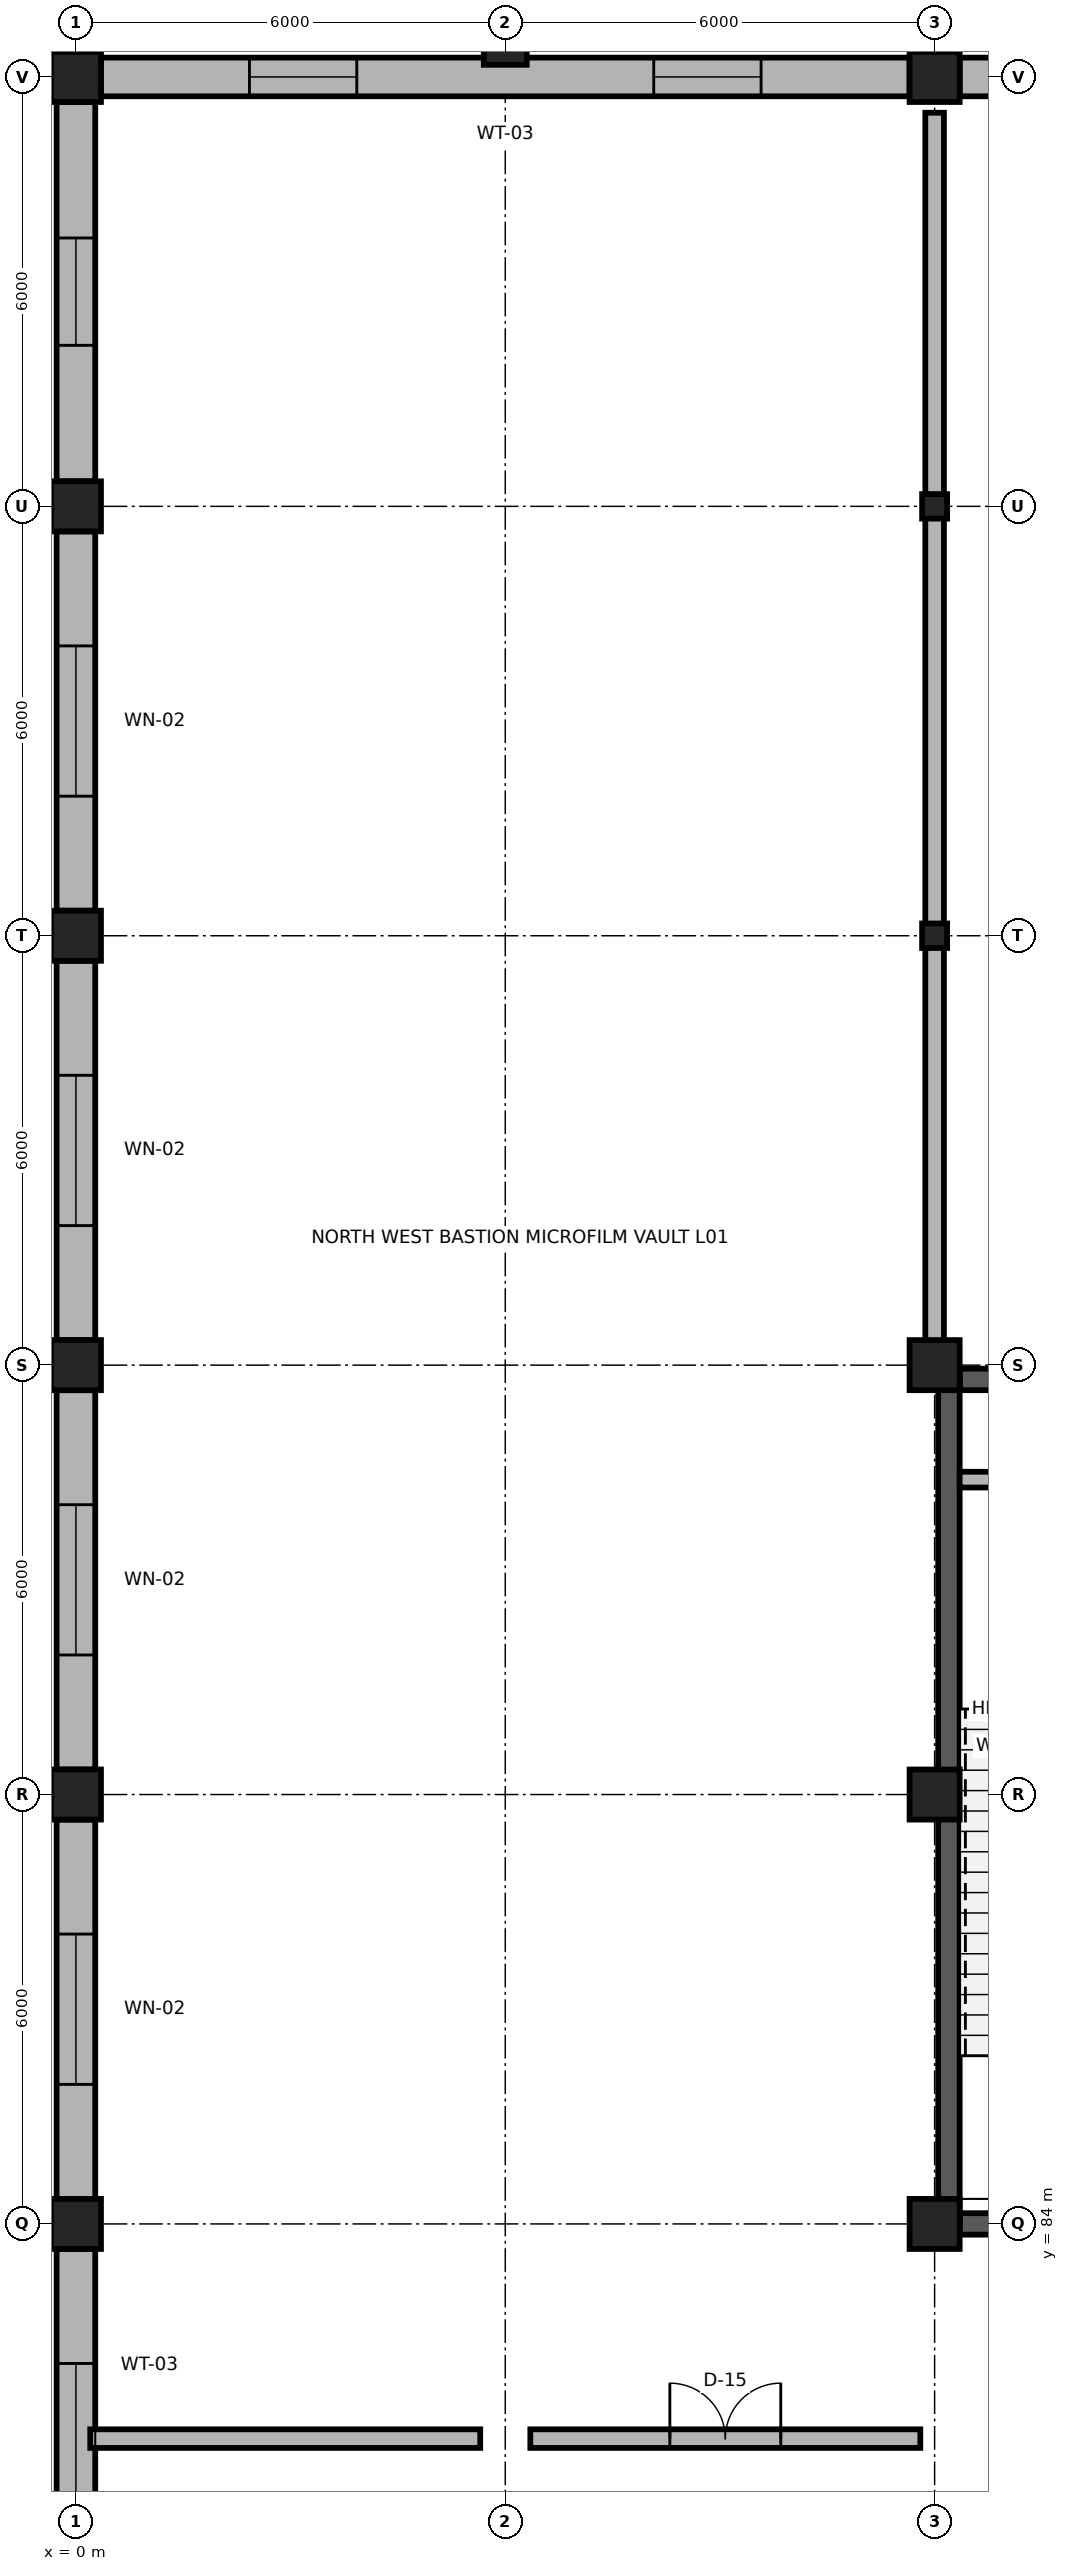
"""IFC4 building model, lengths in metres.
Left out: names, types, materials, properties, quantities, classifications, styles, units other than length and angle.
Written with IfcOpenShell. Run it as: python <this file> out.ifc"""

import sys

from ifc_helpers import new_model, si_unit, direction, frame, frame_2d, origin, origin_2d, place, context, subcontext, project, spatial, rectangle, i_section, extrude, element, fill, save


model = new_model("IFC4")
c1 = context("Model", 3, precision=1e-05, world=origin(), true_north=direction((0.0, 1.0)))
c2 = subcontext(c1, "Body", "Model", "MODEL_VIEW")
j1 = project(units=[si_unit("LENGTHUNIT", "METRE"), si_unit("PLANEANGLEUNIT", "RADIAN")], contexts=[c1])
p1 = place(None, origin())
s1 = spatial("IfcSite", under=j1, at=p1, CompositionType="ELEMENT")
p2 = place(p1, origin())
s2 = spatial("IfcBuilding", under=s1, at=p2, CompositionType="ELEMENT")
p3 = place(p2, origin())
s3 = spatial("IfcBuildingStorey", under=s2, at=p3, CompositionType="ELEMENT", Elevation=0.0)
for number, where, z_axis, x_axis in (
    (1, (0.0, 84.0, 0.0), (0.0, 0.0, 1.0), (1.0, 0.0, 0.0)),
    (2, (12.0, 84.0, 0.0), (0.0, 0.0, 1.0), (1.0, 0.0, 0.0)),
    (3, (0.0, 90.0, 0.0), (0.0, 0.0, 1.0), (1.0, 0.0, 0.0)),
    (4, (12.0, 90.0, 0.0), (0.0, 0.0, 1.0), (1.0, 0.0, 0.0)),
    (5, (0.0, 96.0, 0.0), (0.0, 0.0, 1.0), (1.0, 0.0, 0.0)),
    (6, (12.0, 96.0, 0.0), (0.0, 0.0, 1.0), (1.0, 0.0, 0.0)),
    (7, (0.0, 102.0, 0.0), (0.0, 0.0, 1.0), (1.0, 0.0, 0.0)),
):
    element("IfcColumn", number, at=place(p3, frame(where, z_axis=z_axis, x_axis=x_axis)), inside=s3, PredefinedType="COLUMN", context=c2, shape_type="SweptSolid", body=[
        extrude(rectangle(XDim=0.7, YDim=0.7, at=origin_2d()), origin(), (0.0, 0.0, 1.0), 6.0),
    ])
p4 = place(p3, frame((12.0, 102.0, 0.0), z_axis=(0.0, 0.0, 1.0), x_axis=(1.0, 0.0, 0.0)))
e8 = element("IfcColumn", 8, at=p4, inside=s3, PredefinedType="COLUMN", context=c2, shape_type="SweptSolid", body=[
    extrude(i_section(OverallWidth=0.35, OverallDepth=0.343, WebThickness=0.01, FlangeThickness=0.015, FilletRadius=0.02, at=origin_2d()), origin(), (0.0, 0.0, 1.0), 6.0),
])
p5 = place(p3, frame((0.0, 108.0, 0.0), z_axis=(0.0, 0.0, 1.0), x_axis=(1.0, 0.0, 0.0)))
e9 = element("IfcColumn", 9, at=p5, inside=s3, PredefinedType="COLUMN", context=c2, shape_type="SweptSolid", body=[
    extrude(rectangle(XDim=0.7, YDim=0.7, at=origin_2d()), origin(), (0.0, 0.0, 1.0), 6.0),
])
p6 = place(p3, frame((12.0, 108.0, 0.0), z_axis=(0.0, 0.0, 1.0), x_axis=(1.0, 0.0, 0.0)))
e10 = element("IfcColumn", 10, at=p6, inside=s3, PredefinedType="COLUMN", context=c2, shape_type="SweptSolid", body=[
    extrude(i_section(OverallWidth=0.35, OverallDepth=0.343, WebThickness=0.01, FlangeThickness=0.015, FilletRadius=0.02, at=origin_2d()), origin(), (0.0, 0.0, 1.0), 6.0),
])
for number, where, z_axis, x_axis in (
    (11, (0.0, 114.0, 0.0), (0.0, 0.0, 1.0), (1.0, 0.0, 0.0)),
    (12, (12.0, 114.0, 0.0), (0.0, 0.0, 1.0), (1.0, 0.0, 0.0)),
):
    element("IfcColumn", number, at=place(p3, frame(where, z_axis=z_axis, x_axis=x_axis)), inside=s3, PredefinedType="COLUMN", context=c2, shape_type="SweptSolid", body=[
        extrude(rectangle(XDim=0.7, YDim=0.7, at=origin_2d()), origin(), (0.0, 0.0, 1.0), 6.0),
    ])
p7 = place(p3, frame((6.0, 114.35, 0.0), z_axis=(0.0, 0.0, 1.0), x_axis=(1.0, 0.0, 0.0)))
e13 = element("IfcColumn", 13, at=p7, inside=s3, PredefinedType="PILASTER", context=c2, shape_type="SweptSolid", body=[
    extrude(rectangle(XDim=0.6, YDim=0.36, at=origin_2d()), origin(), (0.0, 0.0, 1.0), 6.0),
])
p8 = place(p3, frame((0.35, 114.0, 0.0), z_axis=(0.0, 0.0, 1.0), x_axis=(1.0, 0.0, 0.0)))
e14 = element("IfcWall", 14, at=p8, inside=s3, PredefinedType="SOLIDWALL", context=c2, shape_type="SweptSolid", body=[
    extrude(rectangle(XDim=11.3, YDim=0.54, at=frame_2d((5.65, 0.0))), origin(), (0.0, 0.0, 1.0), 5.31),
])
p9 = place(p8, frame((2.075, 0.0, 0.85)))
e15 = element("IfcOpeningElement", 15, at=p9, cuts=e14, PredefinedType="OPENING", context=c2, shape_type="SweptSolid", body=[
    extrude(rectangle(XDim=1.5, YDim=2.8, at=frame_2d((0.75, 1.4))), frame((0.0, 0.285, 0.0), z_axis=(0.0, -1.0, 0.0), x_axis=(1.0, 0.0, 0.0)), (0.0, 0.0, 1.0), 0.57),
])
p10 = place(p8, frame((7.725, 0.0, 0.85)))
e16 = element("IfcOpeningElement", 16, at=p10, cuts=e14, PredefinedType="OPENING", context=c2, shape_type="SweptSolid", body=[
    extrude(rectangle(XDim=1.5, YDim=2.8, at=frame_2d((0.75, 1.4))), frame((0.0, 0.285, 0.0), z_axis=(0.0, -1.0, 0.0), x_axis=(1.0, 0.0, 0.0)), (0.0, 0.0, 1.0), 0.57),
])
p11 = place(p3, frame((12.35, 114.0, 0.0), z_axis=(0.0, 0.0, 1.0), x_axis=(1.0, 0.0, 0.0)))
e17 = element("IfcWall", 17, at=p11, inside=s3, PredefinedType="SOLIDWALL", context=c2, shape_type="SweptSolid", body=[
    extrude(rectangle(XDim=5.3, YDim=0.54, at=frame_2d((2.65, 0.0))), origin(), (0.0, 0.0, 1.0), 5.31),
])
p12 = place(p3, frame((0.0, 78.35, 0.0), z_axis=(0.0, 0.0, 1.0), x_axis=(0.0, 1.0, 0.0)))
e18 = element("IfcWall", 18, at=p12, inside=s3, PredefinedType="SOLIDWALL", context=c2, shape_type="SweptSolid", body=[
    extrude(rectangle(XDim=5.3, YDim=0.54, at=frame_2d((2.65, 0.0))), origin(), (0.0, 0.0, 1.0), 5.31),
])
p13 = place(p12, frame((1.6, 0.0, 0.85)))
e19 = element("IfcOpeningElement", 19, at=p13, cuts=e18, PredefinedType="OPENING", context=c2, shape_type="SweptSolid", body=[
    extrude(rectangle(XDim=2.1, YDim=3.4, at=frame_2d((1.05, 1.7))), frame((0.0, 0.285, 0.0), z_axis=(0.0, -1.0, 0.0), x_axis=(1.0, 0.0, 0.0)), (0.0, 0.0, 1.0), 0.57),
])
p14 = place(p3, frame((0.0, 84.35, 0.0), z_axis=(0.0, 0.0, 1.0), x_axis=(0.0, 1.0, 0.0)))
e20 = element("IfcWall", 20, at=p14, inside=s3, PredefinedType="SOLIDWALL", context=c2, shape_type="SweptSolid", body=[
    extrude(rectangle(XDim=5.3, YDim=0.54, at=frame_2d((2.65, 0.0))), origin(), (0.0, 0.0, 1.0), 5.31),
])
p15 = place(p14, frame((1.6, 0.0, 0.85)))
e21 = element("IfcOpeningElement", 21, at=p15, cuts=e20, PredefinedType="OPENING", context=c2, shape_type="SweptSolid", body=[
    extrude(rectangle(XDim=2.1, YDim=3.4, at=frame_2d((1.05, 1.7))), frame((0.0, 0.285, 0.0), z_axis=(0.0, -1.0, 0.0), x_axis=(1.0, 0.0, 0.0)), (0.0, 0.0, 1.0), 0.57),
])
p16 = place(p3, frame((0.0, 90.35, 0.0), z_axis=(0.0, 0.0, 1.0), x_axis=(0.0, 1.0, 0.0)))
e22 = element("IfcWall", 22, at=p16, inside=s3, PredefinedType="SOLIDWALL", context=c2, shape_type="SweptSolid", body=[
    extrude(rectangle(XDim=5.3, YDim=0.54, at=frame_2d((2.65, 0.0))), origin(), (0.0, 0.0, 1.0), 5.31),
])
p17 = place(p16, frame((1.6, 0.0, 0.85)))
e23 = element("IfcOpeningElement", 23, at=p17, cuts=e22, PredefinedType="OPENING", context=c2, shape_type="SweptSolid", body=[
    extrude(rectangle(XDim=2.1, YDim=3.4, at=frame_2d((1.05, 1.7))), frame((0.0, 0.285, 0.0), z_axis=(0.0, -1.0, 0.0), x_axis=(1.0, 0.0, 0.0)), (0.0, 0.0, 1.0), 0.57),
])
p18 = place(p3, frame((0.0, 96.35, 0.0), z_axis=(0.0, 0.0, 1.0), x_axis=(0.0, 1.0, 0.0)))
e24 = element("IfcWall", 24, at=p18, inside=s3, PredefinedType="SOLIDWALL", context=c2, shape_type="SweptSolid", body=[
    extrude(rectangle(XDim=5.3, YDim=0.54, at=frame_2d((2.65, 0.0))), origin(), (0.0, 0.0, 1.0), 5.31),
])
p19 = place(p18, frame((1.6, 0.0, 0.85)))
e25 = element("IfcOpeningElement", 25, at=p19, cuts=e24, PredefinedType="OPENING", context=c2, shape_type="SweptSolid", body=[
    extrude(rectangle(XDim=2.1, YDim=3.4, at=frame_2d((1.05, 1.7))), frame((0.0, 0.285, 0.0), z_axis=(0.0, -1.0, 0.0), x_axis=(1.0, 0.0, 0.0)), (0.0, 0.0, 1.0), 0.57),
])
p20 = place(p3, frame((0.0, 102.35, 0.0), z_axis=(0.0, 0.0, 1.0), x_axis=(0.0, 1.0, 0.0)))
e26 = element("IfcWall", 26, at=p20, inside=s3, PredefinedType="SOLIDWALL", context=c2, shape_type="SweptSolid", body=[
    extrude(rectangle(XDim=5.3, YDim=0.54, at=frame_2d((2.65, 0.0))), origin(), (0.0, 0.0, 1.0), 5.31),
])
p21 = place(p20, frame((1.6, 0.0, 0.85)))
e27 = element("IfcOpeningElement", 27, at=p21, cuts=e26, PredefinedType="OPENING", context=c2, shape_type="SweptSolid", body=[
    extrude(rectangle(XDim=2.1, YDim=3.4, at=frame_2d((1.05, 1.7))), frame((0.0, 0.285, 0.0), z_axis=(0.0, -1.0, 0.0), x_axis=(1.0, 0.0, 0.0)), (0.0, 0.0, 1.0), 0.57),
])
p22 = place(p3, frame((0.0, 108.35, 0.0), z_axis=(0.0, 0.0, 1.0), x_axis=(0.0, 1.0, 0.0)))
e28 = element("IfcWall", 28, at=p22, inside=s3, PredefinedType="SOLIDWALL", context=c2, shape_type="SweptSolid", body=[
    extrude(rectangle(XDim=5.3, YDim=0.54, at=frame_2d((2.65, 0.0))), origin(), (0.0, 0.0, 1.0), 5.31),
])
p23 = place(p22, frame((1.9, 0.0, 0.85)))
e29 = element("IfcOpeningElement", 29, at=p23, cuts=e28, PredefinedType="OPENING", context=c2, shape_type="SweptSolid", body=[
    extrude(rectangle(XDim=1.5, YDim=2.8, at=frame_2d((0.75, 1.4))), frame((0.0, 0.285, 0.0), z_axis=(0.0, -1.0, 0.0), x_axis=(1.0, 0.0, 0.0)), (0.0, 0.0, 1.0), 0.57),
])
p24 = place(p3, frame((12.35, 84.0, 0.0), z_axis=(0.0, 0.0, 1.0), x_axis=(1.0, 0.0, 0.0)))
e30 = element("IfcWall", 30, at=p24, inside=s3, PredefinedType="SHEAR", context=c2, shape_type="SweptSolid", body=[
    extrude(rectangle(XDim=5.3, YDim=0.3, at=frame_2d((2.65, 0.0))), origin(), (0.0, 0.0, 1.0), 5.76),
])
p25 = place(p24, frame((1.925, 0.0, 0.0)))
e31 = element("IfcOpeningElement", 31, at=p25, cuts=e30, PredefinedType="OPENING", context=c2, shape_type="SweptSolid", body=[
    extrude(rectangle(XDim=1.45, YDim=2.25, at=frame_2d((0.725, 1.125))), frame((0.0, 0.165, 0.0), z_axis=(0.0, -1.0, 0.0), x_axis=(1.0, 0.0, 0.0)), (0.0, 0.0, 1.0), 0.33),
])
p26 = place(p3, frame((12.35, 95.8, 0.0), z_axis=(0.0, 0.0, 1.0), x_axis=(1.0, 0.0, 0.0)))
e32 = element("IfcWall", 32, at=p26, inside=s3, PredefinedType="SHEAR", context=c2, shape_type="SweptSolid", body=[
    extrude(rectangle(XDim=5.3, YDim=0.3, at=frame_2d((2.65, 0.0))), origin(), (0.0, 0.0, 1.0), 5.76),
])
p27 = place(p3, frame((12.2, 84.0, 0.0), z_axis=(0.0, 0.0, 1.0), x_axis=(0.0, 1.0, 0.0)))
e33 = element("IfcWall", 33, at=p27, inside=s3, PredefinedType="SHEAR", context=c2, shape_type="SweptSolid", body=[
    extrude(rectangle(XDim=11.8, YDim=0.3, at=frame_2d((5.9, 0.0))), origin(), (0.0, 0.0, 1.0), 5.76),
])
p28 = place(p3, frame((12.35, 94.4, 0.0), z_axis=(0.0, 0.0, 1.0), x_axis=(1.0, 0.0, 0.0)))
e34 = element("IfcWall", 34, at=p28, inside=s3, PredefinedType="PARTITIONING", context=c2, shape_type="SweptSolid", body=[
    extrude(rectangle(XDim=1.1, YDim=0.22, at=frame_2d((0.55, 0.0))), origin(), (0.0, 0.0, 1.0), 5.76),
])
p29 = place(p3, frame((6.35, 81.0, 0.0), z_axis=(0.0, 0.0, 1.0), x_axis=(1.0, 0.0, 0.0)))
e35 = element("IfcWall", 35, at=p29, inside=s3, PredefinedType="PARTITIONING", context=c2, shape_type="SweptSolid", body=[
    extrude(rectangle(XDim=5.45, YDim=0.26, at=frame_2d((2.725, 0.0))), origin(), (0.0, 0.0, 1.0), 5.76),
])
p30 = place(p29, frame((1.95, 0.0, 0.0)))
e36 = element("IfcOpeningElement", 36, at=p30, cuts=e35, PredefinedType="OPENING", context=c2, shape_type="SweptSolid", body=[
    extrude(rectangle(XDim=1.55, YDim=2.3, at=frame_2d((0.775, 1.15))), frame((0.0, 0.145, 0.0), z_axis=(0.0, -1.0, 0.0), x_axis=(1.0, 0.0, 0.0)), (0.0, 0.0, 1.0), 0.29),
])
p31 = place(p3, frame((0.2, 81.0, 0.0), z_axis=(0.0, 0.0, 1.0), x_axis=(1.0, 0.0, 0.0)))
e37 = element("IfcWall", 37, at=p31, inside=s3, PredefinedType="PARTITIONING", context=c2, shape_type="SweptSolid", body=[
    extrude(rectangle(XDim=5.45, YDim=0.26, at=frame_2d((2.725, 0.0))), origin(), (0.0, 0.0, 1.0), 5.76),
])
p32 = place(p3, frame((12.0, 96.2, 0.0), z_axis=(0.0, 0.0, 1.0), x_axis=(0.0, 1.0, 0.0)))
e38 = element("IfcWall", 38, at=p32, inside=s3, PredefinedType="PARTITIONING", context=c2, shape_type="SweptSolid", body=[
    extrude(rectangle(XDim=17.3, YDim=0.26, at=frame_2d((8.65, 0.0))), origin(), (0.0, 0.0, 1.0), 5.32),
])
p33 = place(p9, origin())
e39 = element("IfcWindow", 39, at=p33, inside=s3, PartitioningType="SINGLE_PANEL", PredefinedType="WINDOW", context=c2, shape_type="SweptSolid", body=[
    extrude(rectangle(XDim=1.5, YDim=2.8, at=frame_2d((0.75, 1.4))), frame((0.0, 0.03, 0.0), z_axis=(0.0, -1.0, 0.0), x_axis=(1.0, 0.0, 0.0)), (0.0, 0.0, 1.0), 0.06),
])
fill(e15, e39)
p34 = place(p10, origin())
e40 = element("IfcWindow", 40, at=p34, inside=s3, PartitioningType="SINGLE_PANEL", PredefinedType="WINDOW", context=c2, shape_type="SweptSolid", body=[
    extrude(rectangle(XDim=1.5, YDim=2.8, at=frame_2d((0.75, 1.4))), frame((0.0, 0.03, 0.0), z_axis=(0.0, -1.0, 0.0), x_axis=(1.0, 0.0, 0.0)), (0.0, 0.0, 1.0), 0.06),
])
fill(e16, e40)
p35 = place(p13, origin())
e41 = element("IfcWindow", 41, at=p35, inside=s3, PartitioningType="SINGLE_PANEL", PredefinedType="WINDOW", context=c2, shape_type="SweptSolid", body=[
    extrude(rectangle(XDim=2.1, YDim=3.4, at=frame_2d((1.05, 1.7))), frame((0.0, 0.03, 0.0), z_axis=(0.0, -1.0, 0.0), x_axis=(1.0, 0.0, 0.0)), (0.0, 0.0, 1.0), 0.06),
])
fill(e19, e41)
p36 = place(p15, origin())
e42 = element("IfcWindow", 42, at=p36, inside=s3, PartitioningType="SINGLE_PANEL", PredefinedType="WINDOW", context=c2, shape_type="SweptSolid", body=[
    extrude(rectangle(XDim=2.1, YDim=3.4, at=frame_2d((1.05, 1.7))), frame((0.0, 0.03, 0.0), z_axis=(0.0, -1.0, 0.0), x_axis=(1.0, 0.0, 0.0)), (0.0, 0.0, 1.0), 0.06),
])
fill(e21, e42)
p37 = place(p17, origin())
e43 = element("IfcWindow", 43, at=p37, inside=s3, PartitioningType="SINGLE_PANEL", PredefinedType="WINDOW", context=c2, shape_type="SweptSolid", body=[
    extrude(rectangle(XDim=2.1, YDim=3.4, at=frame_2d((1.05, 1.7))), frame((0.0, 0.03, 0.0), z_axis=(0.0, -1.0, 0.0), x_axis=(1.0, 0.0, 0.0)), (0.0, 0.0, 1.0), 0.06),
])
fill(e23, e43)
p38 = place(p19, origin())
e44 = element("IfcWindow", 44, at=p38, inside=s3, PartitioningType="SINGLE_PANEL", PredefinedType="WINDOW", context=c2, shape_type="SweptSolid", body=[
    extrude(rectangle(XDim=2.1, YDim=3.4, at=frame_2d((1.05, 1.7))), frame((0.0, 0.03, 0.0), z_axis=(0.0, -1.0, 0.0), x_axis=(1.0, 0.0, 0.0)), (0.0, 0.0, 1.0), 0.06),
])
fill(e25, e44)
p39 = place(p21, origin())
e45 = element("IfcWindow", 45, at=p39, inside=s3, PartitioningType="SINGLE_PANEL", PredefinedType="WINDOW", context=c2, shape_type="SweptSolid", body=[
    extrude(rectangle(XDim=2.1, YDim=3.4, at=frame_2d((1.05, 1.7))), frame((0.0, 0.03, 0.0), z_axis=(0.0, -1.0, 0.0), x_axis=(1.0, 0.0, 0.0)), (0.0, 0.0, 1.0), 0.06),
])
fill(e27, e45)
p40 = place(p23, origin())
e46 = element("IfcWindow", 46, at=p40, inside=s3, PartitioningType="SINGLE_PANEL", PredefinedType="WINDOW", context=c2, shape_type="SweptSolid", body=[
    extrude(rectangle(XDim=1.5, YDim=2.8, at=frame_2d((0.75, 1.4))), frame((0.0, 0.03, 0.0), z_axis=(0.0, -1.0, 0.0), x_axis=(1.0, 0.0, 0.0)), (0.0, 0.0, 1.0), 0.06),
])
fill(e29, e46)
p41 = place(p30, origin())
e47 = element("IfcDoor", 47, at=p41, inside=s3, OperationType="DOUBLE_DOOR_SINGLE_SWING", PredefinedType="DOOR", context=c2, shape_type="SweptSolid", body=[
    extrude(rectangle(XDim=1.55, YDim=2.3, at=frame_2d((0.775, 1.15))), frame((0.0, 0.025, 0.0), z_axis=(0.0, -1.0, 0.0), x_axis=(1.0, 0.0, 0.0)), (0.0, 0.0, 1.0), 0.05),
])
fill(e36, e47)
save(model, sys.argv[1])
